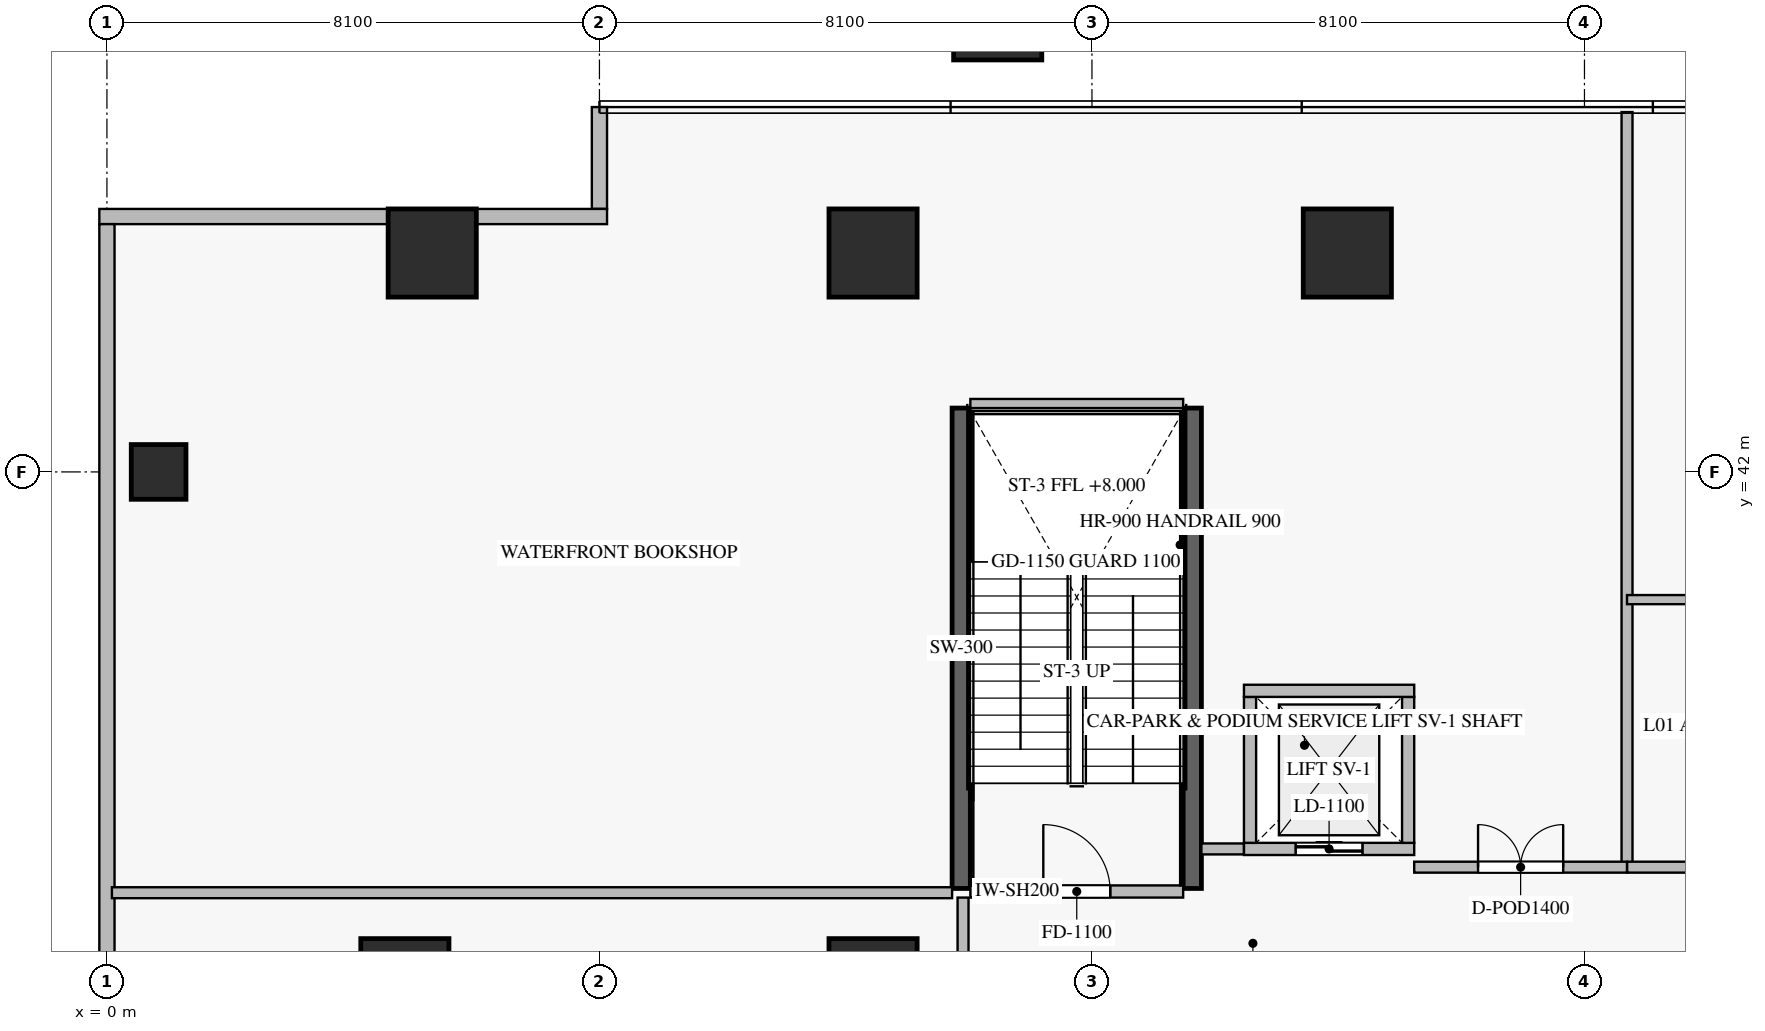
"""IFC4 building model, lengths in metres.
Left out: names, types, materials, properties, quantities, classifications, styles, units other than length and angle.
Written with IfcOpenShell. Run it as: python <this file> out.ifc"""

import sys

from ifc_helpers import new_model, si_unit, direction, frame, frame_2d, origin, origin_2d, place, context, subcontext, project, spatial, rectangle, extrude, source, transform, mapped, element, fill, save


model = new_model("IFC4")
c1 = context("Model", 3, precision=1e-05, world=origin(), true_north=direction((0.0, 1.0)))
c2 = subcontext(c1, "Body", "Model", "MODEL_VIEW")
j1 = project(units=[si_unit("LENGTHUNIT", "METRE"), si_unit("PLANEANGLEUNIT", "RADIAN")], contexts=[c1])
p1 = place(None, origin())
s1 = spatial("IfcSite", under=j1, at=p1, CompositionType="ELEMENT")
p2 = place(p1, origin())
s2 = spatial("IfcBuilding", under=s1, at=p2, CompositionType="ELEMENT")
p3 = place(p2, frame((0.0, 0.0, 5.5)))
s3 = spatial("IfcBuildingStorey", under=s2, at=p3, CompositionType="ELEMENT", Elevation=5.5)
m1 = source(origin(), c2, "Body", "SweptSolid", [
    extrude(rectangle(XDim=0.9, YDim=0.9, at=origin_2d()), origin(), (0.0, 0.0, 1.0), 5.0),
])
p4 = place(p3, frame((0.85, 42.0, -0.38), z_axis=(0.0, 0.0, 1.0), x_axis=(1.0, 0.0, 0.0)))
e1 = element("IfcColumn", 1, at=p4, inside=s3, PredefinedType="COLUMN", context=c2, shape_type="MappedRepresentation", body=[
    mapped(m1, transform((0.0, 0.0, 0.0), scale=1.0)),
])
m2 = source(origin(), c2, "Body", "SweptSolid", [
    extrude(rectangle(XDim=1.45, YDim=1.45, at=origin_2d()), origin(), (0.0, 0.0, 1.0), 5.0),
])
for number, where, z_axis, x_axis in (
    (2, (12.6, 45.6, -0.38), (0.0, 0.0, 1.0), (1.0, 0.0, 0.0)),
    (3, (20.4, 45.6, -0.38), (0.0, 0.0, 1.0), (1.0, 0.0, 0.0)),
    (4, (12.6, 33.6, -0.38), (0.0, 0.0, 1.0), (1.0, 0.0, 0.0)),
    (5, (14.65, 49.5, -0.38), (0.0, 0.0, 1.0), (1.0, 0.0, 0.0)),
    (6, (4.9, 33.6, -0.38), (0.0, 0.0, 1.0), (1.0, 0.0, 0.0)),
    (7, (5.35, 45.6, -0.38), (0.0, 0.0, 1.0), (1.0, 0.0, 0.0)),
):
    element("IfcColumn", number, at=place(p3, frame(where, z_axis=z_axis, x_axis=x_axis)), inside=s3, PredefinedType="COLUMN", context=c2, shape_type="MappedRepresentation", body=[
        mapped(m2, transform((0.0, 0.0, 0.0), scale=1.0)),
    ])
p5 = place(p3, frame((8.1, 48.0, 0.0), z_axis=(0.0, 0.0, 1.0), x_axis=(0.0, -1.0, 0.0)))
e8 = element("IfcWall", 8, at=p5, inside=s3, PredefinedType="ELEMENTEDWALL", context=c2, shape_type="SweptSolid", body=[
    extrude(rectangle(XDim=1.675, YDim=0.25, at=frame_2d((0.837, 0.0))), origin(), (0.0, 0.0, 1.0), 4.605),
])
p6 = place(p3, frame((8.225, 46.2, 0.0), z_axis=(0.0, 0.0, 1.0), x_axis=(-1.0, 0.0, 0.0)))
e9 = element("IfcWall", 9, at=p6, inside=s3, PredefinedType="ELEMENTEDWALL", context=c2, shape_type="SweptSolid", body=[
    extrude(rectangle(XDim=8.35, YDim=0.25, at=frame_2d((4.175, 0.0))), origin(), (0.0, 0.0, 1.0), 4.605),
])
p7 = place(p3, frame((0.0, 46.075, 0.0), z_axis=(0.0, 0.0, 1.0), x_axis=(0.0, -1.0, 0.0)))
e10 = element("IfcWall", 10, at=p7, inside=s3, PredefinedType="ELEMENTEDWALL", context=c2, shape_type="SweptSolid", body=[
    extrude(rectangle(XDim=41.75, YDim=0.25, at=frame_2d((20.875, 0.0))), origin(), (0.0, 0.0, 1.0), 4.605),
])
p8 = place(p7, frame((14.801, 0.0, 0.6)))
e11 = element("IfcOpeningElement", 11, at=p8, cuts=e10, PredefinedType="OPENING", context=c2, shape_type="SweptSolid", body=[
    extrude(rectangle(XDim=2.8, YDim=3.0, at=frame_2d((1.4, 1.5))), frame((0.0, 0.135, 0.0), z_axis=(0.0, -1.0, 0.0), x_axis=(1.0, 0.0, 0.0)), (0.0, 0.0, 1.0), 0.27),
])
p9 = place(p7, frame((24.149, 0.0, 0.6)))
e12 = element("IfcOpeningElement", 12, at=p9, cuts=e10, PredefinedType="OPENING", context=c2, shape_type="SweptSolid", body=[
    extrude(rectangle(XDim=2.8, YDim=3.0, at=frame_2d((1.4, 1.5))), frame((0.0, 0.135, 0.0), z_axis=(0.0, -1.0, 0.0), x_axis=(1.0, 0.0, 0.0)), (0.0, 0.0, 1.0), 0.27),
])
for number, where, z_axis, x_axis in (
    (13, (14.05, 35.15, -0.38), (0.0, 0.0, 1.0), (0.0, 1.0, 0.0)),
    (14, (17.85, 35.15, -0.38), (0.0, 0.0, 1.0), (0.0, 1.0, 0.0)),
):
    element("IfcWall", number, at=place(p3, frame(where, z_axis=z_axis, x_axis=x_axis)), inside=s3, PredefinedType="SHEAR", context=c2, shape_type="SweptSolid", body=[
        extrude(rectangle(XDim=7.9, YDim=0.3, at=frame_2d((3.95, 0.0))), origin(), (0.0, 0.0, 1.0), 4.998),
    ])
p10 = place(p3, frame((14.2, 35.1, 0.0), z_axis=(0.0, 0.0, 1.0), x_axis=(1.0, 0.0, 0.0)))
e15 = element("IfcWall", 15, at=p10, inside=s3, PredefinedType="STANDARD", context=c2, shape_type="SweptSolid", body=[
    extrude(rectangle(XDim=3.5, YDim=0.2, at=frame_2d((1.75, 0.0))), origin(), (0.0, 0.0, 1.0), 4.62),
])
p11 = place(p10, frame((1.2, 0.0, 0.0)))
e16 = element("IfcOpeningElement", 16, at=p11, cuts=e15, PredefinedType="OPENING", context=c2, shape_type="SweptSolid", body=[
    extrude(rectangle(XDim=1.1, YDim=2.15, at=frame_2d((0.55, 1.075))), frame((0.0, 0.11, 0.0), z_axis=(0.0, -1.0, 0.0), x_axis=(1.0, 0.0, 0.0)), (0.0, 0.0, 1.0), 0.22),
])
p12 = place(p3, frame((14.2, 43.1, 0.0), z_axis=(0.0, 0.0, 1.0), x_axis=(1.0, 0.0, 0.0)))
e17 = element("IfcWall", 17, at=p12, inside=s3, PredefinedType="STANDARD", context=c2, shape_type="SweptSolid", body=[
    extrude(rectangle(XDim=3.5, YDim=0.2, at=frame_2d((1.75, 0.0))), origin(), (0.0, 0.0, 1.0), 1.985),
])
p13 = place(p3, frame((18.7, 35.8, 0.0), z_axis=(0.0, 0.0, 1.0), x_axis=(1.0, 0.0, 0.0)))
e18 = element("IfcWall", 18, at=p13, inside=s3, PredefinedType="STANDARD", context=c2, shape_type="SweptSolid", body=[
    extrude(rectangle(XDim=2.8, YDim=0.2, at=frame_2d((1.4, 0.0))), origin(), (0.0, 0.0, 1.0), 4.62),
])
p14 = place(p13, frame((0.85, 0.0, 0.0)))
e19 = element("IfcOpeningElement", 19, at=p14, cuts=e18, PredefinedType="OPENING", context=c2, shape_type="SweptSolid", body=[
    extrude(rectangle(XDim=1.1, YDim=2.2, at=frame_2d((0.55, 1.1))), frame((0.0, 0.11, 0.0), z_axis=(0.0, -1.0, 0.0), x_axis=(1.0, 0.0, 0.0)), (0.0, 0.0, 1.0), 0.22),
])
for number, where, z_axis, x_axis in (
    (20, (18.8, 35.9, 0.0), (0.0, 0.0, 1.0), (0.0, 1.0, 0.0)),
    (21, (21.4, 35.9, 0.0), (0.0, 0.0, 1.0), (0.0, 1.0, 0.0)),
):
    element("IfcWall", number, at=place(p3, frame(where, z_axis=z_axis, x_axis=x_axis)), inside=s3, PredefinedType="STANDARD", context=c2, shape_type="SweptSolid", body=[
        extrude(rectangle(XDim=2.4, YDim=0.2, at=frame_2d((1.2, 0.0))), origin(), (0.0, 0.0, 1.0), 4.62),
    ])
p15 = place(p3, frame((18.7, 38.4, 0.0), z_axis=(0.0, 0.0, 1.0), x_axis=(1.0, 0.0, 0.0)))
e22 = element("IfcWall", 22, at=p15, inside=s3, PredefinedType="STANDARD", context=c2, shape_type="SweptSolid", body=[
    extrude(rectangle(XDim=2.8, YDim=0.2, at=frame_2d((1.4, 0.0))), origin(), (0.0, 0.0, 1.0), 4.62),
])
p16 = place(p3, frame((0.082, 35.08, 0.0), z_axis=(0.0, 0.0, 1.0), x_axis=(1.0, 0.0, 0.0)))
e23 = element("IfcWall", 23, at=p16, inside=s3, PredefinedType="PARTITIONING", context=c2, shape_type="SweptSolid", body=[
    extrude(rectangle(XDim=13.818, YDim=0.18, at=frame_2d((6.909, 0.0))), origin(), (0.0, 0.0, 1.0), 4.62),
])
p17 = place(p3, frame((18.0, 35.8, 0.0), z_axis=(0.0, 0.0, 1.0), x_axis=(1.0, 0.0, 0.0)))
e24 = element("IfcWall", 24, at=p17, inside=s3, PredefinedType="PARTITIONING", context=c2, shape_type="SweptSolid", body=[
    extrude(rectangle(XDim=0.698, YDim=0.18, at=frame_2d((0.349, 0.0))), origin(), (0.0, 0.0, 1.0), 4.62),
])
p18 = place(p3, frame((14.08, 33.08, 0.0), z_axis=(0.0, 0.0, 1.0), x_axis=(0.0, 1.0, 0.0)))
e25 = element("IfcWall", 25, at=p18, inside=s3, PredefinedType="PARTITIONING", context=c2, shape_type="SweptSolid", body=[
    extrude(rectangle(XDim=1.92, YDim=0.18, at=frame_2d((0.96, 0.0))), origin(), (0.0, 0.0, 1.0), 4.62),
])
p19 = place(p3, frame((25.0, 35.5, 0.0), z_axis=(0.0, 0.0, 1.0), x_axis=(0.0, 1.0, 0.0)))
e26 = element("IfcWall", 26, at=p19, inside=s3, PredefinedType="PARTITIONING", context=c2, shape_type="SweptSolid", body=[
    extrude(rectangle(XDim=12.418, YDim=0.18, at=frame_2d((6.209, 0.0))), origin(), (0.0, 0.0, 1.0), 4.62),
])
p20 = place(p3, frame((21.5, 35.5, 0.0), z_axis=(0.0, 0.0, 1.0), x_axis=(1.0, 0.0, 0.0)))
e27 = element("IfcWall", 27, at=p20, inside=s3, PredefinedType="PARTITIONING", context=c2, shape_type="SweptSolid", body=[
    extrude(rectangle(XDim=3.5, YDim=0.18, at=frame_2d((1.75, 0.0))), origin(), (0.0, 0.0, 1.0), 4.62),
])
p21 = place(p20, frame((1.05, 0.0, 0.0)))
e28 = element("IfcOpeningElement", 28, at=p21, cuts=e27, PredefinedType="OPENING", context=c2, shape_type="SweptSolid", body=[
    extrude(rectangle(XDim=1.4, YDim=2.25, at=frame_2d((0.7, 1.125))), frame((0.0, 0.1, 0.0), z_axis=(0.0, -1.0, 0.0), x_axis=(1.0, 0.0, 0.0)), (0.0, 0.0, 1.0), 0.2),
])
p22 = place(p3, frame((25.002, 35.5, 0.0), z_axis=(0.0, 0.0, 1.0), x_axis=(1.0, 0.0, 0.0)))
e29 = element("IfcWall", 29, at=p22, inside=s3, PredefinedType="PARTITIONING", context=c2, shape_type="SweptSolid", body=[
    extrude(rectangle(XDim=3.848, YDim=0.18, at=frame_2d((1.924, 0.0))), origin(), (0.0, 0.0, 1.0), 4.62),
])
p23 = place(p22, frame((1.424, 0.0, 0.0)))
e30 = element("IfcOpeningElement", 30, at=p23, cuts=e29, PredefinedType="OPENING", context=c2, shape_type="SweptSolid", body=[
    extrude(rectangle(XDim=1.0, YDim=2.15, at=frame_2d((0.5, 1.075))), frame((0.0, 0.1, 0.0), z_axis=(0.0, -1.0, 0.0), x_axis=(1.0, 0.0, 0.0)), (0.0, 0.0, 1.0), 0.2),
])
p24 = place(p3, frame((25.0, 39.9, 0.0), z_axis=(0.0, 0.0, 1.0), x_axis=(1.0, 0.0, 0.0)))
e31 = element("IfcWall", 31, at=p24, inside=s3, PredefinedType="PARTITIONING", context=c2, shape_type="SweptSolid", body=[
    extrude(rectangle(XDim=12.85, YDim=0.15, at=frame_2d((6.425, 0.0))), origin(), (0.0, 0.0, 1.0), 4.62),
])
p25 = place(p24, frame((2.151, 0.0, 0.0)))
e32 = element("IfcOpeningElement", 32, at=p25, cuts=e31, PredefinedType="OPENING", context=c2, shape_type="SweptSolid", body=[
    extrude(rectangle(XDim=0.9, YDim=2.1, at=frame_2d((0.45, 1.05))), frame((0.0, 0.085, 0.0), z_axis=(0.0, -1.0, 0.0), x_axis=(1.0, 0.0, 0.0)), (0.0, 0.0, 1.0), 0.17),
])
m3 = source(origin(), c2, "Body", "SweptSolid", [
    extrude(rectangle(XDim=1.1, YDim=2.15, at=frame_2d((0.55, 1.075))), frame((0.0, 0.025, 0.0), z_axis=(0.0, -1.0, 0.0), x_axis=(1.0, 0.0, 0.0)), (0.0, 0.0, 1.0), 0.05),
])
p26 = place(p11, origin())
e33 = element("IfcDoor", 33, at=p26, inside=s3, OperationType="SINGLE_SWING_LEFT", PredefinedType="DOOR", context=c2, shape_type="MappedRepresentation", body=[
    mapped(m3, transform((0.0, 0.0, 0.0), scale=1.0)),
])
fill(e16, e33)
m4 = source(origin(), c2, "Body", "SweptSolid", [
    extrude(rectangle(XDim=1.1, YDim=2.2, at=frame_2d((0.55, 1.1))), frame((0.0, 0.025, 0.0), z_axis=(0.0, -1.0, 0.0), x_axis=(1.0, 0.0, 0.0)), (0.0, 0.0, 1.0), 0.05),
])
p27 = place(p14, origin())
e34 = element("IfcDoor", 34, at=p27, inside=s3, OperationType="DOUBLE_DOOR_SLIDING", PredefinedType="DOOR", context=c2, shape_type="MappedRepresentation", body=[
    mapped(m4, transform((0.0, 0.0, 0.0), scale=1.0)),
])
fill(e19, e34)
m5 = source(origin(), c2, "Body", "SweptSolid", [
    extrude(rectangle(XDim=1.4, YDim=2.25, at=frame_2d((0.7, 1.125))), frame((0.0, 0.025, 0.0), z_axis=(0.0, -1.0, 0.0), x_axis=(1.0, 0.0, 0.0)), (0.0, 0.0, 1.0), 0.05),
])
p28 = place(p21, origin())
e35 = element("IfcDoor", 35, at=p28, inside=s3, OperationType="DOUBLE_DOOR_SINGLE_SWING", PredefinedType="DOOR", context=c2, shape_type="MappedRepresentation", body=[
    mapped(m5, transform((0.0, 0.0, 0.0), scale=1.0)),
])
fill(e28, e35)
save(model, sys.argv[1])
